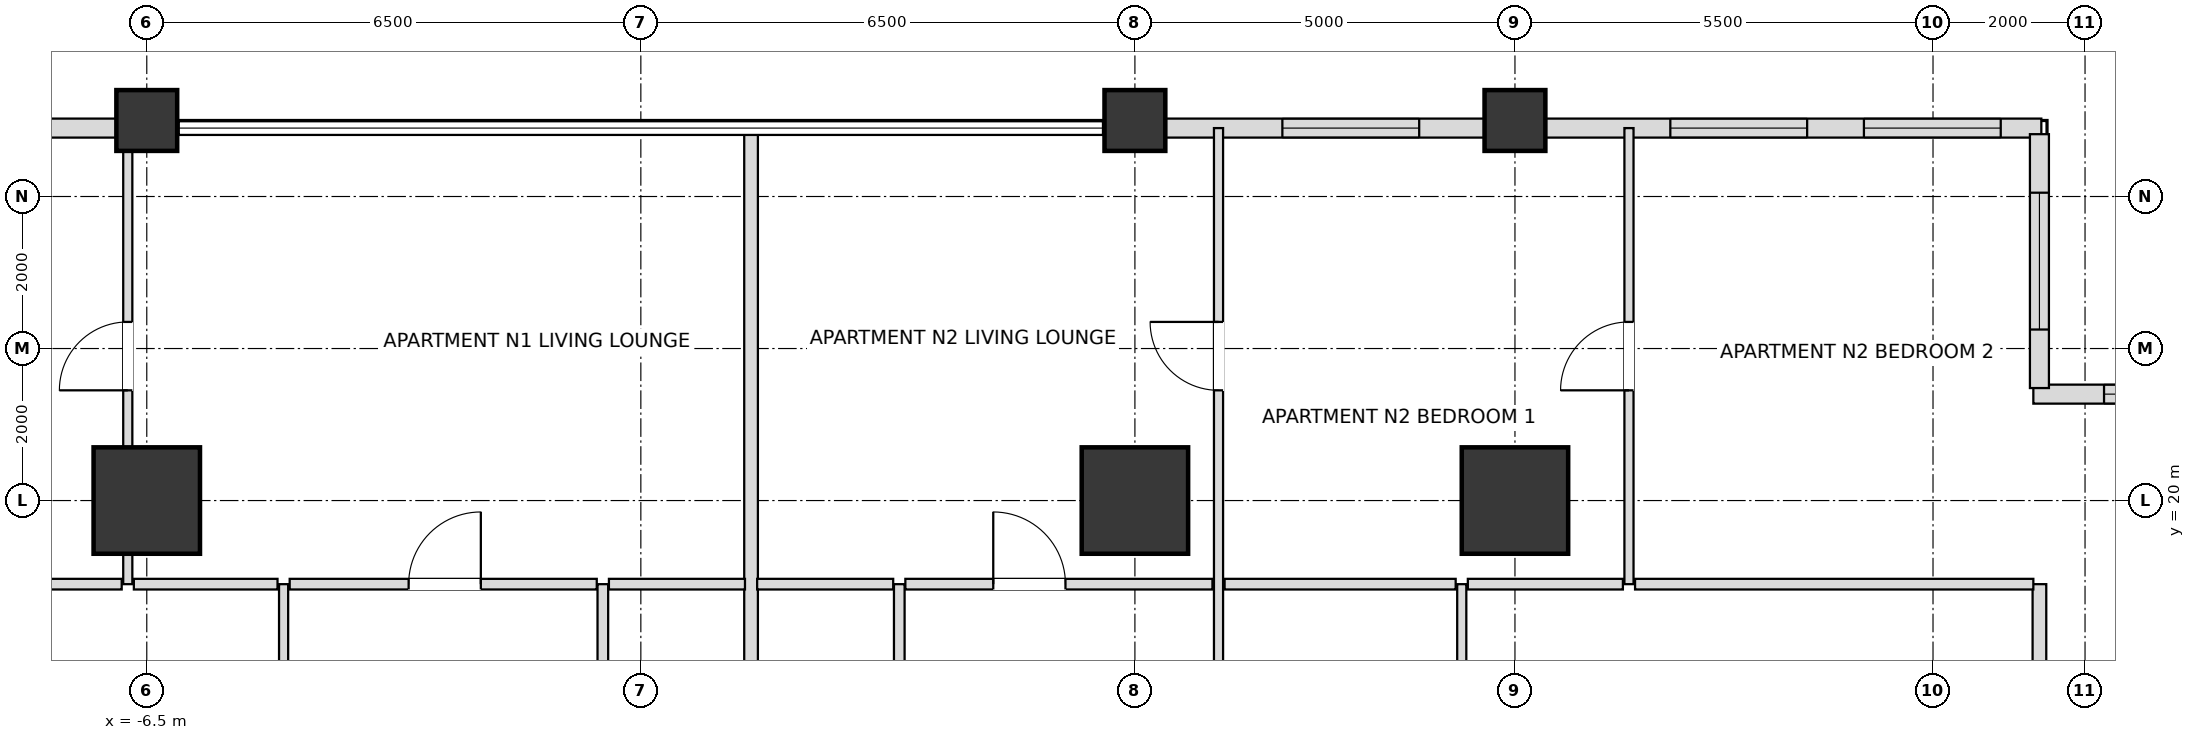
"""IFC4 building model, lengths in metres.
Left out: names, types, materials, properties, quantities, classifications, styles, units other than length and angle.
Written with IfcOpenShell. Run it as: python <this file> out.ifc"""

import sys

from ifc_helpers import new_model, si_unit, direction, frame, frame_2d, origin, origin_2d, place, context, subcontext, project, spatial, rectangle, extrude, element, fill, save


model = new_model("IFC4")
c1 = context("Model", 3, precision=1e-05, world=origin(), true_north=direction((0.0, 1.0)))
c2 = subcontext(c1, "Body", "Model", "MODEL_VIEW")
j1 = project(units=[si_unit("LENGTHUNIT", "METRE"), si_unit("PLANEANGLEUNIT", "RADIAN")], contexts=[c1])
p1 = place(None, origin())
s1 = spatial("IfcSite", under=j1, at=p1, CompositionType="ELEMENT")
p2 = place(p1, origin())
s2 = spatial("IfcBuilding", under=s1, at=p2, CompositionType="ELEMENT")
p3 = place(p2, frame((0.0, 0.0, 90.0)))
s3 = spatial("IfcBuildingStorey", under=s2, at=p3, CompositionType="ELEMENT", Elevation=90.0)
for number, where, z_axis, x_axis in (
    (1, (11.5, 20.0, 0.0), (0.0, 0.0, 1.0), (1.0, 0.0, 0.0)),
    (2, (6.5, 20.0, 0.0), (0.0, 0.0, 1.0), (1.0, 0.0, 0.0)),
    (3, (-6.5, 20.0, 0.0), (0.0, 0.0, 1.0), (1.0, 0.0, 0.0)),
):
    element("IfcColumn", number, at=place(p3, frame(where, z_axis=z_axis, x_axis=x_axis)), inside=s3, PredefinedType="USERDEFINED", context=c2, shape_type="SweptSolid", body=[
        extrude(rectangle(XDim=1.4, YDim=1.4, at=origin_2d()), origin(), (0.0, 0.0, 1.0), 3.6),
    ])
for number, where, z_axis, x_axis in (
    (4, (-6.5, 25.0, 0.0), (0.0, 0.0, 1.0), (1.0, 0.0, 0.0)),
    (5, (6.5, 25.0, 0.0), (0.0, 0.0, 1.0), (1.0, 0.0, 0.0)),
    (6, (11.5, 25.0, 0.0), (0.0, 0.0, 1.0), (1.0, 0.0, 0.0)),
):
    element("IfcColumn", number, at=place(p3, frame(where, z_axis=z_axis, x_axis=x_axis)), inside=s3, PredefinedType="COLUMN", context=c2, shape_type="SweptSolid", body=[
        extrude(rectangle(XDim=0.8, YDim=0.8, at=origin_2d()), origin(), (0.0, 0.0, 1.0), 3.6),
    ])
p4 = place(p3, frame((18.425, 24.9, 0.0), z_axis=(0.0, 0.0, 1.0), x_axis=(-1.0, 0.0, 0.0)))
e7 = element("IfcWall", 7, at=p4, inside=s3, PredefinedType="SOLIDWALL", context=c2, shape_type="SweptSolid", body=[
    extrude(rectangle(XDim=6.53, YDim=0.25, at=frame_2d((3.265, 0.0))), origin(), (0.0, 0.0, 1.0), 2.59),
])
p5 = place(p4, frame((0.534, 0.0, 0.72)))
e8 = element("IfcOpeningElement", 8, at=p5, cuts=e7, PredefinedType="OPENING", context=c2, shape_type="SweptSolid", body=[
    extrude(rectangle(XDim=1.8, YDim=1.68, at=frame_2d((0.9, 0.84))), frame((0.0, 0.135, 0.0), z_axis=(0.0, -1.0, 0.0), x_axis=(1.0, 0.0, 0.0)), (0.0, 0.0, 1.0), 0.27),
])
p6 = place(p4, frame((3.081, 0.0, 0.72)))
e9 = element("IfcOpeningElement", 9, at=p6, cuts=e7, PredefinedType="OPENING", context=c2, shape_type="SweptSolid", body=[
    extrude(rectangle(XDim=1.8, YDim=1.68, at=frame_2d((0.9, 0.84))), frame((0.0, 0.135, 0.0), z_axis=(0.0, -1.0, 0.0), x_axis=(1.0, 0.0, 0.0)), (0.0, 0.0, 1.0), 0.27),
])
p7 = place(p3, frame((11.105, 24.9, 0.0), z_axis=(0.0, 0.0, 1.0), x_axis=(-1.0, 0.0, 0.0)))
e10 = element("IfcWall", 10, at=p7, inside=s3, PredefinedType="SOLIDWALL", context=c2, shape_type="SweptSolid", body=[
    extrude(rectangle(XDim=4.21, YDim=0.25, at=frame_2d((2.105, 0.0))), origin(), (0.0, 0.0, 1.0), 2.59),
])
p8 = place(p7, frame((0.865, 0.0, 0.72)))
e11 = element("IfcOpeningElement", 11, at=p8, cuts=e10, PredefinedType="OPENING", context=c2, shape_type="SweptSolid", body=[
    extrude(rectangle(XDim=1.8, YDim=1.68, at=frame_2d((0.9, 0.84))), frame((0.0, 0.135, 0.0), z_axis=(0.0, -1.0, 0.0), x_axis=(1.0, 0.0, 0.0)), (0.0, 0.0, 1.0), 0.27),
])
p9 = place(p3, frame((-6.895, 24.9, 0.0), z_axis=(0.0, 0.0, 1.0), x_axis=(-1.0, 0.0, 0.0)))
e12 = element("IfcWall", 12, at=p9, inside=s3, PredefinedType="SOLIDWALL", context=c2, shape_type="SweptSolid", body=[
    extrude(rectangle(XDim=4.21, YDim=0.25, at=frame_2d((2.105, 0.0))), origin(), (0.0, 0.0, 1.0), 2.59),
])
p10 = place(p9, frame((1.205, 0.0, 0.72)))
e13 = element("IfcOpeningElement", 13, at=p10, cuts=e12, PredefinedType="OPENING", context=c2, shape_type="SweptSolid", body=[
    extrude(rectangle(XDim=1.8, YDim=1.68, at=frame_2d((0.9, 0.84))), frame((0.0, 0.135, 0.0), z_axis=(0.0, -1.0, 0.0), x_axis=(1.0, 0.0, 0.0)), (0.0, 0.0, 1.0), 0.27),
])
p11 = place(p3, frame((21.98, 21.4, 0.0), z_axis=(0.0, 0.0, 1.0), x_axis=(-1.0, 0.0, 0.0)))
e14 = element("IfcWall", 14, at=p11, inside=s3, PredefinedType="SOLIDWALL", context=c2, shape_type="SweptSolid", body=[
    extrude(rectangle(XDim=3.66, YDim=0.25, at=frame_2d((1.83, 0.0))), origin(), (0.0, 0.0, 1.0), 2.59),
])
p12 = place(p11, frame((0.93, 0.0, 0.72)))
e15 = element("IfcOpeningElement", 15, at=p12, cuts=e14, PredefinedType="OPENING", context=c2, shape_type="SweptSolid", body=[
    extrude(rectangle(XDim=1.8, YDim=1.68, at=frame_2d((0.9, 0.84))), frame((0.0, 0.135, 0.0), z_axis=(0.0, -1.0, 0.0), x_axis=(1.0, 0.0, 0.0)), (0.0, 0.0, 1.0), 0.27),
])
p13 = place(p3, frame((18.4, 21.48, 0.0), z_axis=(0.0, 0.0, 1.0), x_axis=(0.0, 1.0, 0.0)))
e16 = element("IfcWall", 16, at=p13, inside=s3, PredefinedType="SOLIDWALL", context=c2, shape_type="SweptSolid", body=[
    extrude(rectangle(XDim=3.34, YDim=0.25, at=frame_2d((1.67, 0.0))), origin(), (0.0, 0.0, 1.0), 2.59),
])
p14 = place(p13, frame((0.77, 0.0, 0.72)))
e17 = element("IfcOpeningElement", 17, at=p14, cuts=e16, PredefinedType="OPENING", context=c2, shape_type="SweptSolid", body=[
    extrude(rectangle(XDim=1.8, YDim=1.68, at=frame_2d((0.9, 0.84))), frame((0.0, 0.135, 0.0), z_axis=(0.0, -1.0, 0.0), x_axis=(1.0, 0.0, 0.0)), (0.0, 0.0, 1.0), 0.27),
])
p15 = place(p3, frame((-6.75, 18.9, 0.0), z_axis=(0.0, 0.0, 1.0), x_axis=(0.0, 1.0, 0.0)))
e18 = element("IfcWall", 18, at=p15, inside=s3, PredefinedType="PARTITIONING", context=c2, shape_type="SweptSolid", body=[
    extrude(rectangle(XDim=6.0, YDim=0.12, at=frame_2d((3.0, 0.0))), origin(), (0.0, 0.0, 1.0), 2.736),
])
p16 = place(p15, frame((2.55, 0.0, 0.0)))
e19 = element("IfcOpeningElement", 19, at=p16, cuts=e18, PredefinedType="OPENING", context=c2, shape_type="SweptSolid", body=[
    extrude(rectangle(XDim=0.9, YDim=2.1, at=frame_2d((0.45, 1.05))), frame((0.0, 0.07, 0.0), z_axis=(0.0, -1.0, 0.0), x_axis=(1.0, 0.0, 0.0)), (0.0, 0.0, 1.0), 0.14),
])
p17 = place(p3, frame((-4.7, 9.3, 0.0), z_axis=(0.0, 0.0, 1.0), x_axis=(0.0, 1.0, 0.0)))
e20 = element("IfcWall", 20, at=p17, inside=s3, PredefinedType="PARTITIONING", context=c2, shape_type="SweptSolid", body=[
    extrude(rectangle(XDim=9.6, YDim=0.12, at=frame_2d((4.8, 0.0))), origin(), (0.0, 0.0, 1.0), 2.868),
])
p18 = place(p17, frame((4.325, 0.0, 0.0)))
e21 = element("IfcOpeningElement", 21, at=p18, cuts=e20, PredefinedType="OPENING", context=c2, shape_type="SweptSolid", body=[
    extrude(rectangle(XDim=0.95, YDim=2.1, at=frame_2d((0.475, 1.05))), frame((0.0, 0.07, 0.0), z_axis=(0.0, -1.0, 0.0), x_axis=(1.0, 0.0, 0.0)), (0.0, 0.0, 1.0), 0.14),
])
p19 = place(p3, frame((-0.5, 9.3, 0.0), z_axis=(0.0, 0.0, 1.0), x_axis=(0.0, 1.0, 0.0)))
e22 = element("IfcWall", 22, at=p19, inside=s3, PredefinedType="PARTITIONING", context=c2, shape_type="SweptSolid", body=[
    extrude(rectangle(XDim=9.6, YDim=0.14, at=frame_2d((4.8, 0.0))), origin(), (0.0, 0.0, 1.0), 2.868),
])
p20 = place(p19, frame((4.35, 0.0, 0.0)))
e23 = element("IfcOpeningElement", 23, at=p20, cuts=e22, PredefinedType="OPENING", context=c2, shape_type="SweptSolid", body=[
    extrude(rectangle(XDim=0.9, YDim=2.1, at=frame_2d((0.45, 1.05))), frame((0.0, 0.08, 0.0), z_axis=(0.0, -1.0, 0.0), x_axis=(1.0, 0.0, 0.0)), (0.0, 0.0, 1.0), 0.16),
])
p21 = place(p3, frame((1.45, 9.3, 0.0), z_axis=(0.0, 0.0, 1.0), x_axis=(0.0, 1.0, 0.0)))
e24 = element("IfcWall", 24, at=p21, inside=s3, PredefinedType="PARTITIONING", context=c2, shape_type="SweptSolid", body=[
    extrude(rectangle(XDim=15.6, YDim=0.18, at=frame_2d((7.8, 0.0))), origin(), (0.0, 0.0, 1.0), 2.736),
])
p22 = place(p3, frame((3.4, 9.3, 0.0), z_axis=(0.0, 0.0, 1.0), x_axis=(0.0, 1.0, 0.0)))
e25 = element("IfcWall", 25, at=p22, inside=s3, PredefinedType="PARTITIONING", context=c2, shape_type="SweptSolid", body=[
    extrude(rectangle(XDim=9.6, YDim=0.14, at=frame_2d((4.8, 0.0))), origin(), (0.0, 0.0, 1.0), 2.868),
])
p23 = place(p22, frame((4.35, 0.0, 0.0)))
e26 = element("IfcOpeningElement", 26, at=p23, cuts=e25, PredefinedType="OPENING", context=c2, shape_type="SweptSolid", body=[
    extrude(rectangle(XDim=0.9, YDim=2.1, at=frame_2d((0.45, 1.05))), frame((0.0, 0.08, 0.0), z_axis=(0.0, -1.0, 0.0), x_axis=(1.0, 0.0, 0.0)), (0.0, 0.0, 1.0), 0.16),
])
p24 = place(p3, frame((7.6, 9.3, 0.0), z_axis=(0.0, 0.0, 1.0), x_axis=(0.0, 1.0, 0.0)))
e27 = element("IfcWall", 27, at=p24, inside=s3, PredefinedType="PARTITIONING", context=c2, shape_type="SweptSolid", body=[
    extrude(rectangle(XDim=15.6, YDim=0.12, at=frame_2d((7.8, 0.0))), origin(), (0.0, 0.0, 1.0), 2.736),
])
p25 = place(p24, frame((4.325, 0.0, 0.0)))
e28 = element("IfcOpeningElement", 28, at=p25, cuts=e27, PredefinedType="OPENING", context=c2, shape_type="SweptSolid", body=[
    extrude(rectangle(XDim=0.95, YDim=2.1, at=frame_2d((0.475, 1.05))), frame((0.0, 0.07, 0.0), z_axis=(0.0, -1.0, 0.0), x_axis=(1.0, 0.0, 0.0)), (0.0, 0.0, 1.0), 0.14),
])
p26 = place(p24, frame((12.15, 0.0, 0.0)))
e29 = element("IfcOpeningElement", 29, at=p26, cuts=e27, PredefinedType="OPENING", context=c2, shape_type="SweptSolid", body=[
    extrude(rectangle(XDim=0.9, YDim=2.1, at=frame_2d((0.45, 1.05))), frame((0.0, 0.07, 0.0), z_axis=(0.0, -1.0, 0.0), x_axis=(1.0, 0.0, 0.0)), (0.0, 0.0, 1.0), 0.14),
])
p27 = place(p3, frame((10.8, 9.3, 0.0), z_axis=(0.0, 0.0, 1.0), x_axis=(0.0, 1.0, 0.0)))
e30 = element("IfcWall", 30, at=p27, inside=s3, PredefinedType="PARTITIONING", context=c2, shape_type="SweptSolid", body=[
    extrude(rectangle(XDim=9.6, YDim=0.12, at=frame_2d((4.8, 0.0))), origin(), (0.0, 0.0, 1.0), 2.736),
])
p28 = place(p27, frame((4.325, 0.0, 0.0)))
e31 = element("IfcOpeningElement", 31, at=p28, cuts=e30, PredefinedType="OPENING", context=c2, shape_type="SweptSolid", body=[
    extrude(rectangle(XDim=0.95, YDim=2.1, at=frame_2d((0.475, 1.05))), frame((0.0, 0.07, 0.0), z_axis=(0.0, -1.0, 0.0), x_axis=(1.0, 0.0, 0.0)), (0.0, 0.0, 1.0), 0.14),
])
p29 = place(p3, frame((13.0, 18.9, 0.0), z_axis=(0.0, 0.0, 1.0), x_axis=(0.0, 1.0, 0.0)))
e32 = element("IfcWall", 32, at=p29, inside=s3, PredefinedType="PARTITIONING", context=c2, shape_type="SweptSolid", body=[
    extrude(rectangle(XDim=6.0, YDim=0.12, at=frame_2d((3.0, 0.0))), origin(), (0.0, 0.0, 1.0), 2.59),
])
p30 = place(p29, frame((2.55, 0.0, 0.0)))
e33 = element("IfcOpeningElement", 33, at=p30, cuts=e32, PredefinedType="OPENING", context=c2, shape_type="SweptSolid", body=[
    extrude(rectangle(XDim=0.9, YDim=2.1, at=frame_2d((0.45, 1.05))), frame((0.0, 0.07, 0.0), z_axis=(0.0, -1.0, 0.0), x_axis=(1.0, 0.0, 0.0)), (0.0, 0.0, 1.0), 0.14),
])
p31 = place(p3, frame((18.4, 9.3, 0.0), z_axis=(0.0, 0.0, 1.0), x_axis=(0.0, 1.0, 0.0)))
e34 = element("IfcWall", 34, at=p31, inside=s3, PredefinedType="PARTITIONING", context=c2, shape_type="SweptSolid", body=[
    extrude(rectangle(XDim=9.6, YDim=0.18, at=frame_2d((4.8, 0.0))), origin(), (0.0, 0.0, 1.0), 2.59),
])
p32 = place(p3, frame((-7.82, 18.9, 0.0), z_axis=(0.0, 0.0, 1.0), x_axis=(1.0, 0.0, 0.0)))
e35 = element("IfcWall", 35, at=p32, inside=s3, PredefinedType="PARTITIONING", context=c2, shape_type="SweptSolid", body=[
    extrude(rectangle(XDim=0.99, YDim=0.14, at=frame_2d((0.495, 0.0))), origin(), (0.0, 0.0, 1.0), 3.3),
])
p33 = place(p3, frame((-6.67, 18.9, 0.0), z_axis=(0.0, 0.0, 1.0), x_axis=(1.0, 0.0, 0.0)))
e36 = element("IfcWall", 36, at=p33, inside=s3, PredefinedType="PARTITIONING", context=c2, shape_type="SweptSolid", body=[
    extrude(rectangle(XDim=1.89, YDim=0.14, at=frame_2d((0.945, 0.0))), origin(), (0.0, 0.0, 1.0), 2.736),
])
p34 = place(p3, frame((-4.62, 18.9, 0.0), z_axis=(0.0, 0.0, 1.0), x_axis=(1.0, 0.0, 0.0)))
e37 = element("IfcWall", 37, at=p34, inside=s3, PredefinedType="PARTITIONING", context=c2, shape_type="SweptSolid", body=[
    extrude(rectangle(XDim=4.04, YDim=0.14, at=frame_2d((2.02, 0.0))), origin(), (0.0, 0.0, 1.0), 3.3),
])
p35 = place(p34, frame((1.565, 0.0, 0.0)))
e38 = element("IfcOpeningElement", 38, at=p35, cuts=e37, PredefinedType="OPENING", context=c2, shape_type="SweptSolid", body=[
    extrude(rectangle(XDim=0.95, YDim=2.1, at=frame_2d((0.475, 1.05))), frame((0.0, 0.08, 0.0), z_axis=(0.0, -1.0, 0.0), x_axis=(1.0, 0.0, 0.0)), (0.0, 0.0, 1.0), 0.16),
])
for number, where, z_axis, x_axis in (
    (39, (-0.42, 18.9, 0.0), (0.0, 0.0, 1.0), (1.0, 0.0, 0.0)),
    (40, (1.53, 18.9, 0.0), (0.0, 0.0, 1.0), (1.0, 0.0, 0.0)),
):
    element("IfcWall", number, at=place(p3, frame(where, z_axis=z_axis, x_axis=x_axis)), inside=s3, PredefinedType="PARTITIONING", context=c2, shape_type="SweptSolid", body=[
        extrude(rectangle(XDim=1.79, YDim=0.14, at=frame_2d((0.895, 0.0))), origin(), (0.0, 0.0, 1.0), 3.3),
    ])
p36 = place(p3, frame((3.48, 18.9, 0.0), z_axis=(0.0, 0.0, 1.0), x_axis=(1.0, 0.0, 0.0)))
e41 = element("IfcWall", 41, at=p36, inside=s3, PredefinedType="PARTITIONING", context=c2, shape_type="SweptSolid", body=[
    extrude(rectangle(XDim=4.04, YDim=0.14, at=frame_2d((2.02, 0.0))), origin(), (0.0, 0.0, 1.0), 2.736),
])
p37 = place(p36, frame((1.156, 0.0, 0.0)))
e42 = element("IfcOpeningElement", 42, at=p37, cuts=e41, PredefinedType="OPENING", context=c2, shape_type="SweptSolid", body=[
    extrude(rectangle(XDim=0.95, YDim=2.1, at=frame_2d((0.475, 1.05))), frame((0.0, 0.08, 0.0), z_axis=(0.0, -1.0, 0.0), x_axis=(1.0, 0.0, 0.0)), (0.0, 0.0, 1.0), 0.16),
])
p38 = place(p3, frame((7.68, 18.9, 0.0), z_axis=(0.0, 0.0, 1.0), x_axis=(1.0, 0.0, 0.0)))
e43 = element("IfcWall", 43, at=p38, inside=s3, PredefinedType="PARTITIONING", context=c2, shape_type="SweptSolid", body=[
    extrude(rectangle(XDim=3.04, YDim=0.14, at=frame_2d((1.52, 0.0))), origin(), (0.0, 0.0, 1.0), 3.3),
])
p39 = place(p3, frame((10.88, 18.9, 0.0), z_axis=(0.0, 0.0, 1.0), x_axis=(1.0, 0.0, 0.0)))
e44 = element("IfcWall", 44, at=p39, inside=s3, PredefinedType="PARTITIONING", context=c2, shape_type="SweptSolid", body=[
    extrude(rectangle(XDim=2.04, YDim=0.14, at=frame_2d((1.02, 0.0))), origin(), (0.0, 0.0, 1.0), 2.59),
])
p40 = place(p3, frame((13.08, 18.9, 0.0), z_axis=(0.0, 0.0, 1.0), x_axis=(1.0, 0.0, 0.0)))
e45 = element("IfcWall", 45, at=p40, inside=s3, PredefinedType="PARTITIONING", context=c2, shape_type="SweptSolid", body=[
    extrude(rectangle(XDim=5.24, YDim=0.14, at=frame_2d((2.62, 0.0))), origin(), (0.0, 0.0, 1.0), 2.59),
])
p41 = place(p5, origin())
e46 = element("IfcWindow", 46, at=p41, inside=s3, PartitioningType="SINGLE_PANEL", PredefinedType="WINDOW", context=c2, shape_type="SweptSolid", body=[
    extrude(rectangle(XDim=1.8, YDim=1.68, at=frame_2d((0.9, 0.84))), frame((0.0, 0.03, 0.0), z_axis=(0.0, -1.0, 0.0), x_axis=(1.0, 0.0, 0.0)), (0.0, 0.0, 1.0), 0.06),
])
fill(e8, e46)
p42 = place(p6, origin())
e47 = element("IfcWindow", 47, at=p42, inside=s3, PartitioningType="SINGLE_PANEL", PredefinedType="WINDOW", context=c2, shape_type="SweptSolid", body=[
    extrude(rectangle(XDim=1.8, YDim=1.68, at=frame_2d((0.9, 0.84))), frame((0.0, 0.03, 0.0), z_axis=(0.0, -1.0, 0.0), x_axis=(1.0, 0.0, 0.0)), (0.0, 0.0, 1.0), 0.06),
])
fill(e9, e47)
p43 = place(p8, origin())
e48 = element("IfcWindow", 48, at=p43, inside=s3, PartitioningType="SINGLE_PANEL", PredefinedType="WINDOW", context=c2, shape_type="SweptSolid", body=[
    extrude(rectangle(XDim=1.8, YDim=1.68, at=frame_2d((0.9, 0.84))), frame((0.0, 0.03, 0.0), z_axis=(0.0, -1.0, 0.0), x_axis=(1.0, 0.0, 0.0)), (0.0, 0.0, 1.0), 0.06),
])
fill(e11, e48)
p44 = place(p12, origin())
e49 = element("IfcWindow", 49, at=p44, inside=s3, PartitioningType="SINGLE_PANEL", PredefinedType="WINDOW", context=c2, shape_type="SweptSolid", body=[
    extrude(rectangle(XDim=1.8, YDim=1.68, at=frame_2d((0.9, 0.84))), frame((0.0, 0.03, 0.0), z_axis=(0.0, -1.0, 0.0), x_axis=(1.0, 0.0, 0.0)), (0.0, 0.0, 1.0), 0.06),
])
fill(e15, e49)
p45 = place(p14, origin())
e50 = element("IfcWindow", 50, at=p45, inside=s3, PartitioningType="SINGLE_PANEL", PredefinedType="WINDOW", context=c2, shape_type="SweptSolid", body=[
    extrude(rectangle(XDim=1.8, YDim=1.68, at=frame_2d((0.9, 0.84))), frame((0.0, 0.03, 0.0), z_axis=(0.0, -1.0, 0.0), x_axis=(1.0, 0.0, 0.0)), (0.0, 0.0, 1.0), 0.06),
])
fill(e17, e50)
p46 = place(p35, origin())
e51 = element("IfcDoor", 51, at=p46, inside=s3, OperationType="SINGLE_SWING_RIGHT", PredefinedType="DOOR", context=c2, shape_type="SweptSolid", body=[
    extrude(rectangle(XDim=0.95, YDim=2.1, at=frame_2d((0.475, 1.05))), frame((0.0, 0.025, 0.0), z_axis=(0.0, -1.0, 0.0), x_axis=(1.0, 0.0, 0.0)), (0.0, 0.0, 1.0), 0.05),
])
fill(e38, e51)
p47 = place(p16, origin())
e52 = element("IfcDoor", 52, at=p47, inside=s3, OperationType="SINGLE_SWING_LEFT", PredefinedType="DOOR", context=c2, shape_type="SweptSolid", body=[
    extrude(rectangle(XDim=0.9, YDim=2.1, at=frame_2d((0.45, 1.05))), frame((0.0, 0.025, 0.0), z_axis=(0.0, -1.0, 0.0), x_axis=(1.0, 0.0, 0.0)), (0.0, 0.0, 1.0), 0.05),
])
fill(e19, e52)
p48 = place(p37, origin())
e53 = element("IfcDoor", 53, at=p48, inside=s3, OperationType="SINGLE_SWING_LEFT", PredefinedType="DOOR", context=c2, shape_type="SweptSolid", body=[
    extrude(rectangle(XDim=0.95, YDim=2.1, at=frame_2d((0.475, 1.05))), frame((0.0, 0.025, 0.0), z_axis=(0.0, -1.0, 0.0), x_axis=(1.0, 0.0, 0.0)), (0.0, 0.0, 1.0), 0.05),
])
fill(e42, e53)
p49 = place(p26, origin())
e54 = element("IfcDoor", 54, at=p49, inside=s3, OperationType="SINGLE_SWING_RIGHT", PredefinedType="DOOR", context=c2, shape_type="SweptSolid", body=[
    extrude(rectangle(XDim=0.9, YDim=2.1, at=frame_2d((0.45, 1.05))), frame((0.0, 0.025, 0.0), z_axis=(0.0, -1.0, 0.0), x_axis=(1.0, 0.0, 0.0)), (0.0, 0.0, 1.0), 0.05),
])
fill(e29, e54)
p50 = place(p30, origin())
e55 = element("IfcDoor", 55, at=p50, inside=s3, OperationType="SINGLE_SWING_LEFT", PredefinedType="DOOR", context=c2, shape_type="SweptSolid", body=[
    extrude(rectangle(XDim=0.9, YDim=2.1, at=frame_2d((0.45, 1.05))), frame((0.0, 0.025, 0.0), z_axis=(0.0, -1.0, 0.0), x_axis=(1.0, 0.0, 0.0)), (0.0, 0.0, 1.0), 0.05),
])
fill(e33, e55)
save(model, sys.argv[1])
